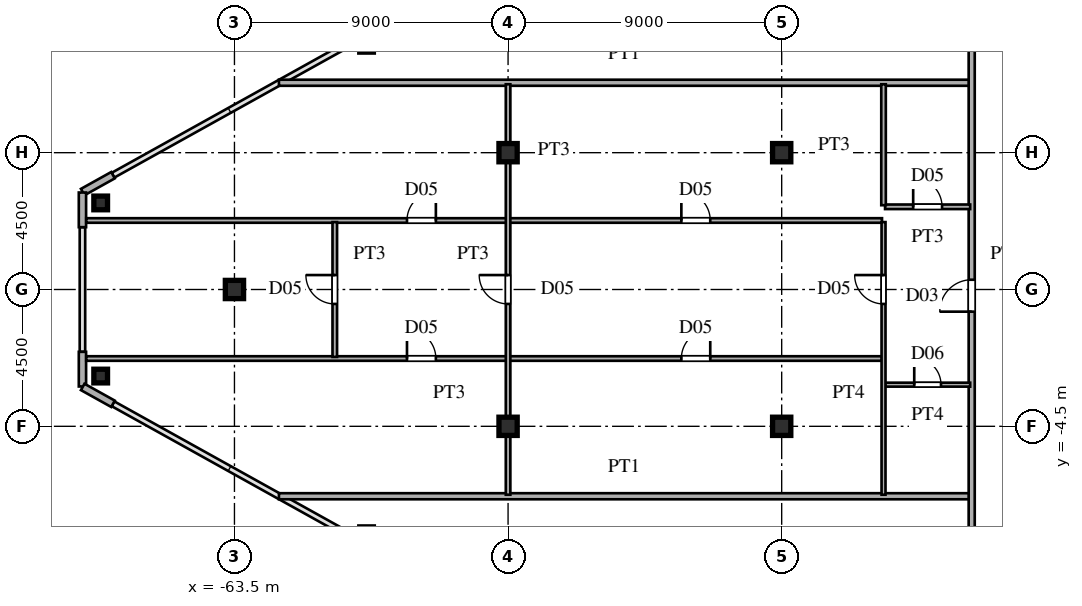
"""IFC4 building model, lengths in metres.
Left out: names, types, materials, properties, quantities, classifications, styles, units other than length and angle.
Written with IfcOpenShell. Run it as: python <this file> out.ifc"""

import sys

from ifc_helpers import new_model, si_unit, direction, frame, frame_2d, origin, origin_2d, place, context, subcontext, project, spatial, rectangle, hollow_rectangle, i_section, extrude, source, transform, mapped, element, fill, save


model = new_model("IFC4")
c1 = context("Model", 3, precision=1e-05, world=origin(), true_north=direction((0.0, 1.0)))
c2 = subcontext(c1, "Body", "Model", "MODEL_VIEW")
j1 = project(units=[si_unit("LENGTHUNIT", "METRE"), si_unit("PLANEANGLEUNIT", "RADIAN")], contexts=[c1])
p1 = place(None, origin())
s1 = spatial("IfcSite", under=j1, at=p1, CompositionType="ELEMENT")
p2 = place(p1, origin())
s2 = spatial("IfcBuilding", under=s1, at=p2, CompositionType="ELEMENT")
p3 = place(p2, frame((0.0, 0.0, 185.1)))
s3 = spatial("IfcBuildingStorey", under=s2, at=p3, CompositionType="ELEMENT", Elevation=185.1)
m1 = source(origin(), c2, "Body", "SweptSolid", [
    extrude(i_section(OverallWidth=0.6, OverallDepth=0.6, WebThickness=0.025, FlangeThickness=0.04, at=origin_2d()), origin(), (0.0, 0.0, 1.0), 3.6),
])
for number, where, z_axis, x_axis in (
    (1, (-45.5, -4.5, 0.0), (0.0, 0.0, 1.0), (1.0, 0.0, 0.0)),
    (2, (-45.5, 4.5, 0.0), (0.0, 0.0, 1.0), (1.0, 0.0, 0.0)),
    (3, (-54.5, -4.5, 0.0), (0.0, 0.0, 1.0), (1.0, 0.0, 0.0)),
    (4, (-54.5, 4.5, 0.0), (0.0, 0.0, 1.0), (1.0, 0.0, 0.0)),
    (5, (-63.5, 0.0, 0.0), (0.0, 0.0, 1.0), (1.0, 0.0, 0.0)),
):
    element("IfcColumn", number, at=place(p3, frame(where, z_axis=z_axis, x_axis=x_axis)), inside=s3, PredefinedType="COLUMN", context=c2, shape_type="MappedRepresentation", body=[
        mapped(m1, transform((0.0, 0.0, 0.0), scale=1.0)),
    ])
m2 = source(origin(), c2, "Body", "SweptSolid", [
    extrude(hollow_rectangle(XDim=0.45, YDim=0.45, WallThickness=0.018, at=origin_2d()), origin(), (0.0, 0.0, 1.0), 3.6),
])
for number, where, z_axis, x_axis in (
    (6, (-67.9, 2.847, 0.0), (0.0, 0.0, 1.0), (1.0, 0.0, 0.0)),
    (7, (-67.9, -2.847, 0.0), (0.0, 0.0, 1.0), (1.0, 0.0, 0.0)),
):
    element("IfcColumn", number, at=place(p3, frame(where, z_axis=z_axis, x_axis=x_axis)), inside=s3, PredefinedType="COLUMN", context=c2, shape_type="MappedRepresentation", body=[
        mapped(m2, transform((0.0, 0.0, 0.0), scale=1.0)),
    ])
for number, where, z_axis, x_axis in (
    (8, (-67.495, 3.759, 0.0), (0.0, 0.0, 1.0), (-0.874, -0.486, 0.0)),
    (9, (-68.5, 3.19, 0.0), (0.0, 0.0, 1.0), (0.0, -1.0, 0.0)),
    (10, (-68.5, -2.05, 0.0), (0.0, 0.0, 1.0), (0.0, -1.0, 0.0)),
    (11, (-68.491, -3.205, 0.0), (0.0, 0.0, 1.0), (0.874, -0.486, 0.0)),
):
    element("IfcWall", number, at=place(p3, frame(where, z_axis=z_axis, x_axis=x_axis)), inside=s3, PredefinedType="SOLIDWALL", context=c2, shape_type="SweptSolid", body=[
        extrude(rectangle(XDim=1.14, YDim=0.24, at=frame_2d((0.57, 0.0))), origin(), (0.0, 0.0, 1.0), 3.38),
    ])
p4 = place(p3, frame((-62.037, -6.8, 0.0), z_axis=(0.0, 0.0, 1.0), x_axis=(1.0, 0.0, 0.0)))
e12 = element("IfcWall", 12, at=p4, inside=s3, PredefinedType="PARTITIONING", context=c2, shape_type="SweptSolid", body=[
    extrude(rectangle(XDim=22.707, YDim=0.2, at=frame_2d((11.354, 0.0))), origin(), (0.0, 0.0, 1.0), 3.38),
])
p5 = place(p3, frame((-42.1, -3.13, 0.0), z_axis=(0.0, 0.0, 1.0), x_axis=(1.0, 0.0, 0.0)))
e13 = element("IfcWall", 13, at=p5, inside=s3, PredefinedType="PARTITIONING", context=c2, shape_type="SweptSolid", body=[
    extrude(rectangle(XDim=2.8, YDim=0.13, at=frame_2d((1.4, 0.0))), origin(), (0.0, 0.0, 1.0), 3.38),
])
p6 = place(p5, frame((0.96, 0.0, 0.0)))
e14 = element("IfcOpeningElement", 14, at=p6, cuts=e13, PredefinedType="OPENING", context=c2, shape_type="SweptSolid", body=[
    extrude(rectangle(XDim=0.88, YDim=2.1, at=frame_2d((0.44, 1.05))), frame((0.0, 0.075, 0.0), z_axis=(0.0, -1.0, 0.0), x_axis=(1.0, 0.0, 0.0)), (0.0, 0.0, 1.0), 0.15),
])
p7 = place(p3, frame((-68.375, -2.27, 0.0), z_axis=(0.0, 0.0, 1.0), x_axis=(1.0, 0.0, 0.0)))
e15 = element("IfcWall", 15, at=p7, inside=s3, PredefinedType="PARTITIONING", context=c2, shape_type="SweptSolid", body=[
    extrude(rectangle(XDim=26.175, YDim=0.15, at=frame_2d((13.087, 0.0))), origin(), (0.0, 0.0, 1.0), 3.38),
])
p8 = place(p7, frame((19.575, 0.0, 0.0)))
e16 = element("IfcOpeningElement", 16, at=p8, cuts=e15, PredefinedType="OPENING", context=c2, shape_type="SweptSolid", body=[
    extrude(rectangle(XDim=0.95, YDim=2.15, at=frame_2d((0.475, 1.075))), frame((0.0, 0.085, 0.0), z_axis=(0.0, -1.0, 0.0), x_axis=(1.0, 0.0, 0.0)), (0.0, 0.0, 1.0), 0.17),
])
p9 = place(p7, frame((10.55, 0.0, 0.0)))
e17 = element("IfcOpeningElement", 17, at=p9, cuts=e15, PredefinedType="OPENING", context=c2, shape_type="SweptSolid", body=[
    extrude(rectangle(XDim=0.95, YDim=2.15, at=frame_2d((0.475, 1.075))), frame((0.0, 0.085, 0.0), z_axis=(0.0, -1.0, 0.0), x_axis=(1.0, 0.0, 0.0)), (0.0, 0.0, 1.0), 0.17),
])
p10 = place(p3, frame((-68.375, 2.27, 0.0), z_axis=(0.0, 0.0, 1.0), x_axis=(1.0, 0.0, 0.0)))
e18 = element("IfcWall", 18, at=p10, inside=s3, PredefinedType="PARTITIONING", context=c2, shape_type="SweptSolid", body=[
    extrude(rectangle(XDim=26.175, YDim=0.15, at=frame_2d((13.087, 0.0))), origin(), (0.0, 0.0, 1.0), 3.38),
])
p11 = place(p10, frame((19.575, 0.0, 0.0)))
e19 = element("IfcOpeningElement", 19, at=p11, cuts=e18, PredefinedType="OPENING", context=c2, shape_type="SweptSolid", body=[
    extrude(rectangle(XDim=0.95, YDim=2.15, at=frame_2d((0.475, 1.075))), frame((0.0, 0.085, 0.0), z_axis=(0.0, -1.0, 0.0), x_axis=(1.0, 0.0, 0.0)), (0.0, 0.0, 1.0), 0.17),
])
p12 = place(p10, frame((10.55, 0.0, 0.0)))
e20 = element("IfcOpeningElement", 20, at=p12, cuts=e18, PredefinedType="OPENING", context=c2, shape_type="SweptSolid", body=[
    extrude(rectangle(XDim=0.95, YDim=2.15, at=frame_2d((0.475, 1.075))), frame((0.0, 0.085, 0.0), z_axis=(0.0, -1.0, 0.0), x_axis=(1.0, 0.0, 0.0)), (0.0, 0.0, 1.0), 0.17),
])
p13 = place(p3, frame((-42.1, 2.72, 0.0), z_axis=(0.0, 0.0, 1.0), x_axis=(1.0, 0.0, 0.0)))
e21 = element("IfcWall", 21, at=p13, inside=s3, PredefinedType="PARTITIONING", context=c2, shape_type="SweptSolid", body=[
    extrude(rectangle(XDim=2.8, YDim=0.15, at=frame_2d((1.4, 0.0))), origin(), (0.0, 0.0, 1.0), 3.38),
])
p14 = place(p13, frame((0.925, 0.0, 0.0)))
e22 = element("IfcOpeningElement", 22, at=p14, cuts=e21, PredefinedType="OPENING", context=c2, shape_type="SweptSolid", body=[
    extrude(rectangle(XDim=0.95, YDim=2.15, at=frame_2d((0.475, 1.075))), frame((0.0, 0.085, 0.0), z_axis=(0.0, -1.0, 0.0), x_axis=(1.0, 0.0, 0.0)), (0.0, 0.0, 1.0), 0.17),
])
p15 = place(p3, frame((-62.037, 6.8, 0.0), z_axis=(0.0, 0.0, 1.0), x_axis=(1.0, 0.0, 0.0)))
e23 = element("IfcWall", 23, at=p15, inside=s3, PredefinedType="PARTITIONING", context=c2, shape_type="SweptSolid", body=[
    extrude(rectangle(XDim=22.707, YDim=0.2, at=frame_2d((11.354, 0.0))), origin(), (0.0, 0.0, 1.0), 3.38),
])
p16 = place(p3, frame((-60.2, -2.217, 0.0), z_axis=(0.0, 0.0, 1.0), x_axis=(0.0, 1.0, 0.0)))
e24 = element("IfcWall", 24, at=p16, inside=s3, PredefinedType="PARTITIONING", context=c2, shape_type="SweptSolid", body=[
    extrude(rectangle(XDim=4.434, YDim=0.15, at=frame_2d((2.217, 0.0))), origin(), (0.0, 0.0, 1.0), 3.38),
])
p17 = place(p16, frame((1.742, 0.0, 0.0)))
e25 = element("IfcOpeningElement", 25, at=p17, cuts=e24, PredefinedType="OPENING", context=c2, shape_type="SweptSolid", body=[
    extrude(rectangle(XDim=0.95, YDim=2.15, at=frame_2d((0.475, 1.075))), frame((0.0, 0.085, 0.0), z_axis=(0.0, -1.0, 0.0), x_axis=(1.0, 0.0, 0.0)), (0.0, 0.0, 1.0), 0.17),
])
p18 = place(p3, frame((-54.5, -6.75, 0.0), z_axis=(0.0, 0.0, 1.0), x_axis=(0.0, 1.0, 0.0)))
e26 = element("IfcWall", 26, at=p18, inside=s3, PredefinedType="PARTITIONING", context=c2, shape_type="SweptSolid", body=[
    extrude(rectangle(XDim=13.5, YDim=0.15, at=frame_2d((6.75, 0.0))), origin(), (0.0, 0.0, 1.0), 2.78),
])
p19 = place(p18, frame((6.275, 0.0, 0.0)))
e27 = element("IfcOpeningElement", 27, at=p19, cuts=e26, PredefinedType="OPENING", context=c2, shape_type="SweptSolid", body=[
    extrude(rectangle(XDim=0.95, YDim=2.15, at=frame_2d((0.475, 1.075))), frame((0.0, 0.085, 0.0), z_axis=(0.0, -1.0, 0.0), x_axis=(1.0, 0.0, 0.0)), (0.0, 0.0, 1.0), 0.17),
])
p20 = place(p3, frame((-42.15, -6.75, 0.0), z_axis=(0.0, 0.0, 1.0), x_axis=(0.0, 1.0, 0.0)))
e28 = element("IfcWall", 28, at=p20, inside=s3, PredefinedType="PARTITIONING", context=c2, shape_type="SweptSolid", body=[
    extrude(rectangle(XDim=8.967, YDim=0.13, at=frame_2d((4.483, 0.0))), origin(), (0.0, 0.0, 1.0), 3.38),
])
p21 = place(p20, frame((6.275, 0.0, 0.0)))
e29 = element("IfcOpeningElement", 29, at=p21, cuts=e28, PredefinedType="OPENING", context=c2, shape_type="SweptSolid", body=[
    extrude(rectangle(XDim=0.95, YDim=2.15, at=frame_2d((0.475, 1.075))), frame((0.0, 0.075, 0.0), z_axis=(0.0, -1.0, 0.0), x_axis=(1.0, 0.0, 0.0)), (0.0, 0.0, 1.0), 0.15),
])
p22 = place(p3, frame((-42.15, 2.772, 0.0), z_axis=(0.0, 0.0, 1.0), x_axis=(0.0, 1.0, 0.0)))
e30 = element("IfcWall", 30, at=p22, inside=s3, PredefinedType="PARTITIONING", context=c2, shape_type="SweptSolid", body=[
    extrude(rectangle(XDim=3.978, YDim=0.15, at=frame_2d((1.989, 0.0))), origin(), (0.0, 0.0, 1.0), 3.38),
])
p23 = place(p3, frame((-39.25, -15.715, 0.0), z_axis=(0.0, 0.0, 1.0), x_axis=(0.0, 1.0, 0.0)))
e31 = element("IfcWall", 31, at=p23, inside=s3, PredefinedType="PARTITIONING", context=c2, shape_type="SweptSolid", body=[
    extrude(rectangle(XDim=31.43, YDim=0.2, at=frame_2d((15.715, 0.0))), origin(), (0.0, 0.0, 1.0), 3.38),
])
p24 = place(p23, frame((3.89, 0.0, 0.0)))
e32 = element("IfcOpeningElement", 32, at=p24, cuts=e31, PredefinedType="OPENING", context=c2, shape_type="SweptSolid", body=[
    extrude(rectangle(XDim=1.05, YDim=2.25, at=frame_2d((0.525, 1.125))), frame((0.0, 0.11, 0.0), z_axis=(0.0, -1.0, 0.0), x_axis=(1.0, 0.0, 0.0)), (0.0, 0.0, 1.0), 0.22),
])
p25 = place(p23, frame((14.986, 0.0, 0.0)))
e33 = element("IfcOpeningElement", 33, at=p25, cuts=e31, PredefinedType="OPENING", context=c2, shape_type="SweptSolid", body=[
    extrude(rectangle(XDim=1.05, YDim=2.25, at=frame_2d((0.525, 1.125))), frame((0.0, 0.11, 0.0), z_axis=(0.0, -1.0, 0.0), x_axis=(1.0, 0.0, 0.0)), (0.0, 0.0, 1.0), 0.22),
])
p26 = place(p23, frame((26.49, 0.0, 0.0)))
e34 = element("IfcOpeningElement", 34, at=p26, cuts=e31, PredefinedType="OPENING", context=c2, shape_type="SweptSolid", body=[
    extrude(rectangle(XDim=1.05, YDim=2.25, at=frame_2d((0.525, 1.125))), frame((0.0, 0.11, 0.0), z_axis=(0.0, -1.0, 0.0), x_axis=(1.0, 0.0, 0.0)), (0.0, 0.0, 1.0), 0.22),
])
m3 = source(origin(), c2, "Body", "SweptSolid", [
    extrude(rectangle(XDim=0.88, YDim=2.1, at=frame_2d((0.44, 1.05))), frame((0.0, 0.025, 0.0), z_axis=(0.0, -1.0, 0.0), x_axis=(1.0, 0.0, 0.0)), (0.0, 0.0, 1.0), 0.05),
])
p27 = place(p6, origin())
e35 = element("IfcDoor", 35, at=p27, inside=s3, OperationType="SINGLE_SWING_LEFT", PredefinedType="DOOR", context=c2, shape_type="MappedRepresentation", body=[
    mapped(m3, transform((0.0, 0.0, 0.0), scale=1.0)),
])
fill(e14, e35)
m4 = source(origin(), c2, "Body", "SweptSolid", [
    extrude(rectangle(XDim=0.95, YDim=2.15, at=frame_2d((0.475, 1.075))), frame((0.0, 0.025, 0.0), z_axis=(0.0, -1.0, 0.0), x_axis=(1.0, 0.0, 0.0)), (0.0, 0.0, 1.0), 0.05),
])
p28 = place(p8, origin())
e36 = element("IfcDoor", 36, at=p28, inside=s3, OperationType="SINGLE_SWING_RIGHT", PredefinedType="DOOR", context=c2, shape_type="MappedRepresentation", body=[
    mapped(m4, transform((0.0, 0.0, 0.0), scale=1.0)),
])
fill(e16, e36)
p29 = place(p9, origin())
e37 = element("IfcDoor", 37, at=p29, inside=s3, OperationType="SINGLE_SWING_LEFT", PredefinedType="DOOR", context=c2, shape_type="MappedRepresentation", body=[
    mapped(m4, transform((0.0, 0.0, 0.0), scale=1.0)),
])
fill(e17, e37)
p30 = place(p11, origin())
e38 = element("IfcDoor", 38, at=p30, inside=s3, OperationType="SINGLE_SWING_LEFT", PredefinedType="DOOR", context=c2, shape_type="MappedRepresentation", body=[
    mapped(m4, transform((0.0, 0.0, 0.0), scale=1.0)),
])
fill(e19, e38)
p31 = place(p12, origin())
e39 = element("IfcDoor", 39, at=p31, inside=s3, OperationType="SINGLE_SWING_RIGHT", PredefinedType="DOOR", context=c2, shape_type="MappedRepresentation", body=[
    mapped(m4, transform((0.0, 0.0, 0.0), scale=1.0)),
])
fill(e20, e39)
p32 = place(p14, origin())
e40 = element("IfcDoor", 40, at=p32, inside=s3, OperationType="SINGLE_SWING_LEFT", PredefinedType="DOOR", context=c2, shape_type="MappedRepresentation", body=[
    mapped(m4, transform((0.0, 0.0, 0.0), scale=1.0)),
])
fill(e22, e40)
p33 = place(p17, origin())
e41 = element("IfcDoor", 41, at=p33, inside=s3, OperationType="SINGLE_SWING_RIGHT", PredefinedType="DOOR", context=c2, shape_type="MappedRepresentation", body=[
    mapped(m4, transform((0.0, 0.0, 0.0), scale=1.0)),
])
fill(e25, e41)
p34 = place(p19, origin())
e42 = element("IfcDoor", 42, at=p34, inside=s3, OperationType="SINGLE_SWING_RIGHT", PredefinedType="DOOR", context=c2, shape_type="MappedRepresentation", body=[
    mapped(m4, transform((0.0, 0.0, 0.0), scale=1.0)),
])
fill(e27, e42)
p35 = place(p21, origin())
e43 = element("IfcDoor", 43, at=p35, inside=s3, OperationType="SINGLE_SWING_RIGHT", PredefinedType="DOOR", context=c2, shape_type="MappedRepresentation", body=[
    mapped(m4, transform((0.0, 0.0, 0.0), scale=1.0)),
])
fill(e29, e43)
m5 = source(origin(), c2, "Body", "SweptSolid", [
    extrude(rectangle(XDim=1.05, YDim=2.25, at=frame_2d((0.525, 1.125))), frame((0.0, 0.025, 0.0), z_axis=(0.0, -1.0, 0.0), x_axis=(1.0, 0.0, 0.0)), (0.0, 0.0, 1.0), 0.05),
])
p36 = place(p25, origin())
e44 = element("IfcDoor", 44, at=p36, inside=s3, OperationType="SINGLE_SWING_LEFT", PredefinedType="DOOR", context=c2, shape_type="MappedRepresentation", body=[
    mapped(m5, transform((0.0, 0.0, 0.0), scale=1.0)),
])
fill(e33, e44)
save(model, sys.argv[1])
